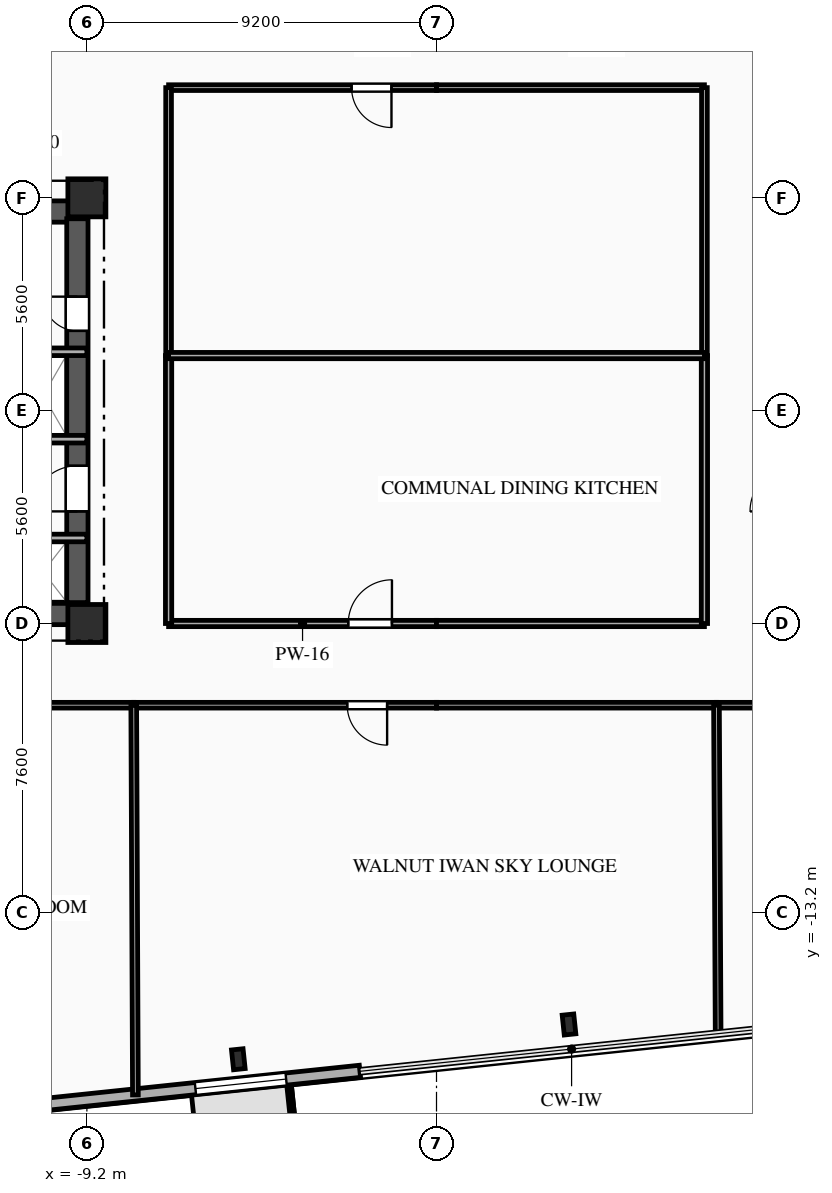
"""IFC4 building model, lengths in metres.
Left out: names, types, materials, properties, quantities, classifications, styles, units other than length and angle.
Written with IfcOpenShell. Run it as: python <this file> out.ifc"""

import sys

from ifc_helpers import new_model, si_unit, direction, frame, frame_2d, origin, origin_2d, place, context, subcontext, project, spatial, rectangle, i_section, extrude, element, fill, save


model = new_model("IFC4")
c1 = context("Model", 3, precision=1e-05, world=origin(), true_north=direction((0.0, 1.0)))
c2 = subcontext(c1, "Body", "Model", "MODEL_VIEW")
j1 = project(units=[si_unit("LENGTHUNIT", "METRE"), si_unit("PLANEANGLEUNIT", "RADIAN")], contexts=[c1])
p1 = place(None, origin())
s1 = spatial("IfcSite", under=j1, at=p1, CompositionType="ELEMENT")
p2 = place(p1, origin())
s2 = spatial("IfcBuilding", under=s1, at=p2, CompositionType="ELEMENT")
p3 = place(p2, frame((0.0, 0.0, 95.75)))
s3 = spatial("IfcBuildingStorey", under=s2, at=p3, CompositionType="ELEMENT", Elevation=95.75)
for number, where, z_axis, x_axis in (
    (1, (-9.2, -5.6, 0.0), (0.0, 0.0, 1.0), (1.0, 0.0, 0.0)),
    (2, (-9.2, 5.6, 0.0), (0.0, 0.0, 1.0), (1.0, 0.0, 0.0)),
):
    element("IfcColumn", number, at=place(p3, frame(where, z_axis=z_axis, x_axis=x_axis)), inside=s3, PredefinedType="COLUMN", context=c2, shape_type="SweptSolid", body=[
        extrude(rectangle(XDim=1.0, YDim=1.0, at=origin_2d()), origin(), (0.0, 0.0, 1.0), 3.35),
    ])
for number, where, z_axis, x_axis in (
    (3, (-5.215, -17.066, 0.0), (0.0, 0.0, 1.0), (0.995, 0.105, 0.0)),
    (4, (3.487, -16.151, 0.0), (0.0, 0.0, 1.0), (0.995, 0.105, 0.0)),
):
    element("IfcColumn", number, at=place(p3, frame(where, z_axis=z_axis, x_axis=x_axis)), inside=s3, PredefinedType="COLUMN", context=c2, shape_type="SweptSolid", body=[
        extrude(i_section(OverallWidth=0.306, OverallDepth=0.524, WebThickness=0.021, FlangeThickness=0.04, FilletRadius=0.027, at=origin_2d()), origin(), (0.0, 0.0, 1.0), 3.35),
    ])
p4 = place(p3, frame((-2.015, -17.383, 0.0), z_axis=(0.0, 0.0, 1.0), x_axis=(-0.994521393935, -0.104533233979, 0.0)))
e5 = element("IfcWall", 5, at=p4, inside=s3, PredefinedType="SOLIDWALL", context=c2, shape_type="SweptSolid", body=[
    extrude(rectangle(XDim=21.3, YDim=0.32, at=frame_2d((10.65, 0.0))), origin(), (0.0, 0.0, 1.0), 3.045),
])
p5 = place(p4, frame((1.953, 0.0, 0.85)))
e6 = element("IfcOpeningElement", 6, at=p5, cuts=e5, PredefinedType="OPENING", context=c2, shape_type="SweptSolid", body=[
    extrude(rectangle(XDim=2.4, YDim=1.95, at=frame_2d((1.2, 0.975))), frame((0.0, 0.17, 0.0), z_axis=(0.0, -1.0, 0.0), x_axis=(1.0, 0.0, 0.0)), (0.0, 0.0, 1.0), 0.34),
])
p6 = place(p4, frame((8.944, 0.0, 0.85)))
e7 = element("IfcOpeningElement", 7, at=p6, cuts=e5, PredefinedType="OPENING", context=c2, shape_type="SweptSolid", body=[
    extrude(rectangle(XDim=1.65, YDim=1.85, at=frame_2d((0.825, 0.925))), frame((0.0, 0.17, 0.0), z_axis=(0.0, -1.0, 0.0), x_axis=(1.0, 0.0, 0.0)), (0.0, 0.0, 1.0), 0.34),
])
p7 = place(p4, frame((16.391, 0.0, 0.85)))
e8 = element("IfcOpeningElement", 8, at=p7, cuts=e5, PredefinedType="OPENING", context=c2, shape_type="SweptSolid", body=[
    extrude(rectangle(XDim=1.65, YDim=1.85, at=frame_2d((0.825, 0.925))), frame((0.0, 0.17, 0.0), z_axis=(0.0, -1.0, 0.0), x_axis=(1.0, 0.0, 0.0)), (0.0, 0.0, 1.0), 0.34),
])
p8 = place(p3, frame((-18.8, 5.24, 0.0), z_axis=(0.0, 0.0, 1.0), x_axis=(1.0, 0.0, 0.0)))
e9 = element("IfcWall", 9, at=p8, inside=s3, PredefinedType="SHEAR", context=c2, shape_type="SweptSolid", body=[
    extrude(rectangle(XDim=9.6, YDim=0.56, at=frame_2d((4.8, 0.0))), origin(), (0.0, 0.0, 1.0), 3.045),
])
p9 = place(p8, frame((1.55, 0.0, 0.0)))
e10 = element("IfcOpeningElement", 10, at=p9, cuts=e9, PredefinedType="OPENING", context=c2, shape_type="SweptSolid", body=[
    extrude(rectangle(XDim=1.1, YDim=2.15, at=frame_2d((0.55, 1.075))), frame((0.0, 0.29, 0.0), z_axis=(0.0, -1.0, 0.0), x_axis=(1.0, 0.0, 0.0)), (0.0, 0.0, 1.0), 0.58),
])
p10 = place(p8, frame((4.775, 0.0, 0.0)))
e11 = element("IfcOpeningElement", 11, at=p10, cuts=e9, PredefinedType="OPENING", context=c2, shape_type="SweptSolid", body=[
    extrude(rectangle(XDim=1.05, YDim=2.1, at=frame_2d((0.525, 1.05))), frame((0.0, 0.29, 0.0), z_axis=(0.0, -1.0, 0.0), x_axis=(1.0, 0.0, 0.0)), (0.0, 0.0, 1.0), 0.58),
])
p11 = place(p3, frame((-18.8, -5.35, 0.0), z_axis=(0.0, 0.0, 1.0), x_axis=(1.0, 0.0, 0.0)))
e12 = element("IfcWall", 12, at=p11, inside=s3, PredefinedType="SHEAR", context=c2, shape_type="SweptSolid", body=[
    extrude(rectangle(XDim=9.6, YDim=0.56, at=frame_2d((4.8, 0.0))), origin(), (0.0, 0.0, 1.0), 3.045),
])
p12 = place(p11, frame((1.05, 0.0, 0.0)))
e13 = element("IfcOpeningElement", 13, at=p12, cuts=e12, PredefinedType="OPENING", context=c2, shape_type="SweptSolid", body=[
    extrude(rectangle(XDim=0.9, YDim=2.1, at=frame_2d((0.45, 1.05))), frame((0.0, 0.29, 0.0), z_axis=(0.0, -1.0, 0.0), x_axis=(1.0, 0.0, 0.0)), (0.0, 0.0, 1.0), 0.58),
])
p13 = place(p3, frame((-9.45, -5.05, 0.0), z_axis=(0.0, 0.0, 1.0), x_axis=(0.0, 1.0, 0.0)))
e14 = element("IfcWall", 14, at=p13, inside=s3, PredefinedType="SHEAR", context=c2, shape_type="SweptSolid", body=[
    extrude(rectangle(XDim=10.1, YDim=0.56, at=frame_2d((5.05, 0.0))), origin(), (0.0, 0.0, 1.0), 3.045),
])
p14 = place(p13, frame((7.15, 0.0, 0.0)))
e15 = element("IfcOpeningElement", 15, at=p14, cuts=e14, PredefinedType="OPENING", context=c2, shape_type="SweptSolid", body=[
    extrude(rectangle(XDim=0.9, YDim=2.1, at=frame_2d((0.45, 1.05))), frame((0.0, 0.29, 0.0), z_axis=(0.0, -1.0, 0.0), x_axis=(1.0, 0.0, 0.0)), (0.0, 0.0, 1.0), 0.58),
])
p15 = place(p13, frame((2.4, 0.0, 0.0)))
e16 = element("IfcOpeningElement", 16, at=p15, cuts=e14, PredefinedType="OPENING", context=c2, shape_type="SweptSolid", body=[
    extrude(rectangle(XDim=1.2, YDim=2.15, at=frame_2d((0.6, 1.075))), frame((0.0, 0.29, 0.0), z_axis=(0.0, -1.0, 0.0), x_axis=(1.0, 0.0, 0.0)), (0.0, 0.0, 1.0), 0.58),
])
p16 = place(p3, frame((-11.08, -3.35, 0.0), z_axis=(0.0, 0.0, 1.0), x_axis=(1.0, 0.0, 0.0)))
e17 = element("IfcWall", 17, at=p16, inside=s3, PredefinedType="PARTITIONING", context=c2, shape_type="SweptSolid", body=[
    extrude(rectangle(XDim=1.88, YDim=0.2, at=frame_2d((0.94, 0.0))), origin(), (0.0, 0.0, 1.0), 2.76),
])
p17 = place(p3, frame((-9.2, -0.75, 0.0), z_axis=(0.0, 0.0, 1.0), x_axis=(-1.0, 0.0, 0.0)))
e18 = element("IfcWall", 18, at=p17, inside=s3, PredefinedType="PARTITIONING", context=c2, shape_type="SweptSolid", body=[
    extrude(rectangle(XDim=1.88, YDim=0.2, at=frame_2d((0.94, 0.0))), origin(), (0.0, 0.0, 1.0), 3.045),
])
p18 = place(p3, frame((0.0, 8.5, 0.0), z_axis=(0.0, 0.0, 1.0), x_axis=(-1.0, 0.0, 0.0)))
e19 = element("IfcWall", 19, at=p18, inside=s3, PredefinedType="PARTITIONING", context=c2, shape_type="SweptSolid", body=[
    extrude(rectangle(XDim=7.05, YDim=0.15, at=frame_2d((3.525, 0.0))), origin(), (0.0, 0.0, 1.0), 3.045),
])
p19 = place(p18, frame((1.185, 0.0, 0.0)))
e20 = element("IfcOpeningElement", 20, at=p19, cuts=e19, PredefinedType="OPENING", context=c2, shape_type="SweptSolid", body=[
    extrude(rectangle(XDim=1.05, YDim=2.15, at=frame_2d((0.525, 1.075))), frame((0.0, 0.085, 0.0), z_axis=(0.0, -1.0, 0.0), x_axis=(1.0, 0.0, 0.0)), (0.0, 0.0, 1.0), 0.17),
])
p20 = place(p3, frame((7.05, 8.5, 0.0), z_axis=(0.0, 0.0, 1.0), x_axis=(-1.0, 0.0, 0.0)))
e21 = element("IfcWall", 21, at=p20, inside=s3, PredefinedType="PARTITIONING", context=c2, shape_type="SweptSolid", body=[
    extrude(rectangle(XDim=7.05, YDim=0.15, at=frame_2d((3.525, 0.0))), origin(), (0.0, 0.0, 1.0), 3.045),
])
p21 = place(p3, frame((-7.967, -7.75, 0.0), z_axis=(0.0, 0.0, 1.0), x_axis=(-1.0, 0.0, 0.0)))
e22 = element("IfcWall", 22, at=p21, inside=s3, PredefinedType="PARTITIONING", context=c2, shape_type="SweptSolid", body=[
    extrude(rectangle(XDim=7.516, YDim=0.15, at=frame_2d((3.758, 0.0))), origin(), (0.0, 0.0, 1.0), 3.045),
])
p22 = place(p21, frame((5.223, 0.0, 0.0)))
e23 = element("IfcOpeningElement", 23, at=p22, cuts=e22, PredefinedType="OPENING", context=c2, shape_type="SweptSolid", body=[
    extrude(rectangle(XDim=1.05, YDim=2.15, at=frame_2d((0.525, 1.075))), frame((0.0, 0.085, 0.0), z_axis=(0.0, -1.0, 0.0), x_axis=(1.0, 0.0, 0.0)), (0.0, 0.0, 1.0), 0.17),
])
p23 = place(p3, frame((0.0, -7.75, 0.0), z_axis=(0.0, 0.0, 1.0), x_axis=(-1.0, 0.0, 0.0)))
e24 = element("IfcWall", 24, at=p23, inside=s3, PredefinedType="PARTITIONING", context=c2, shape_type="SweptSolid", body=[
    extrude(rectangle(XDim=7.967, YDim=0.15, at=frame_2d((3.983, 0.0))), origin(), (0.0, 0.0, 1.0), 3.045),
])
p24 = place(p23, frame((1.3, 0.0, 0.0)))
e25 = element("IfcOpeningElement", 25, at=p24, cuts=e24, PredefinedType="OPENING", context=c2, shape_type="SweptSolid", body=[
    extrude(rectangle(XDim=1.05, YDim=2.15, at=frame_2d((0.525, 1.075))), frame((0.0, 0.085, 0.0), z_axis=(0.0, -1.0, 0.0), x_axis=(1.0, 0.0, 0.0)), (0.0, 0.0, 1.0), 0.17),
])
p25 = place(p3, frame((-7.05, -5.6, 0.0), z_axis=(0.0, 0.0, 1.0), x_axis=(1.0, 0.0, 0.0)))
e26 = element("IfcWall", 26, at=p25, inside=s3, PredefinedType="PARTITIONING", context=c2, shape_type="SweptSolid", body=[
    extrude(rectangle(XDim=7.05, YDim=0.165, at=frame_2d((3.525, 0.0))), origin(), (0.0, 0.0, 1.0), 2.53),
])
p26 = place(p25, frame((4.728, 0.0, 0.0)))
e27 = element("IfcOpeningElement", 27, at=p26, cuts=e26, PredefinedType="OPENING", context=c2, shape_type="SweptSolid", body=[
    extrude(rectangle(XDim=1.15, YDim=2.15, at=frame_2d((0.575, 1.075))), frame((0.0, 0.093, 0.0), z_axis=(0.0, -1.0, 0.0), x_axis=(1.0, 0.0, 0.0)), (0.0, 0.0, 1.0), 0.185),
])
p27 = place(p3, frame((7.367, -7.75, 0.0), z_axis=(0.0, 0.0, 1.0), x_axis=(-1.0, 0.0, 0.0)))
e28 = element("IfcWall", 28, at=p27, inside=s3, PredefinedType="PARTITIONING", context=c2, shape_type="SweptSolid", body=[
    extrude(rectangle(XDim=7.367, YDim=0.15, at=frame_2d((3.684, 0.0))), origin(), (0.0, 0.0, 1.0), 3.045),
])
p28 = place(p3, frame((23.0, -7.75, 0.0), z_axis=(0.0, 0.0, 1.0), x_axis=(-1.0, 0.0, 0.0)))
e29 = element("IfcWall", 29, at=p28, inside=s3, PredefinedType="PARTITIONING", context=c2, shape_type="SweptSolid", body=[
    extrude(rectangle(XDim=15.633, YDim=0.15, at=frame_2d((7.816, 0.0))), origin(), (0.0, 0.0, 1.0), 3.045),
])
p29 = place(p28, frame((8.969, 0.0, 0.0)))
e30 = element("IfcOpeningElement", 30, at=p29, cuts=e29, PredefinedType="OPENING", context=c2, shape_type="SweptSolid", body=[
    extrude(rectangle(XDim=1.05, YDim=2.15, at=frame_2d((0.525, 1.075))), frame((0.0, 0.085, 0.0), z_axis=(0.0, -1.0, 0.0), x_axis=(1.0, 0.0, 0.0)), (0.0, 0.0, 1.0), 0.17),
])
p30 = place(p3, frame((0.0, -5.6, 0.0), z_axis=(0.0, 0.0, 1.0), x_axis=(1.0, 0.0, 0.0)))
e31 = element("IfcWall", 31, at=p30, inside=s3, PredefinedType="PARTITIONING", context=c2, shape_type="SweptSolid", body=[
    extrude(rectangle(XDim=7.05, YDim=0.165, at=frame_2d((3.525, 0.0))), origin(), (0.0, 0.0, 1.0), 2.53),
])
p31 = place(p3, frame((-7.05, 1.45, 0.0), z_axis=(0.0, 0.0, 1.0), x_axis=(0.0, -1.0, 0.0)))
e32 = element("IfcWall", 32, at=p31, inside=s3, PredefinedType="PARTITIONING", context=c2, shape_type="SweptSolid", body=[
    extrude(rectangle(XDim=7.05, YDim=0.165, at=frame_2d((3.525, 0.0))), origin(), (0.0, 0.0, 1.0), 3.045),
])
p32 = place(p3, frame((-7.05, 8.5, 0.0), z_axis=(0.0, 0.0, 1.0), x_axis=(0.0, -1.0, 0.0)))
e33 = element("IfcWall", 33, at=p32, inside=s3, PredefinedType="PARTITIONING", context=c2, shape_type="SweptSolid", body=[
    extrude(rectangle(XDim=7.05, YDim=0.15, at=frame_2d((3.525, 0.0))), origin(), (0.0, 0.0, 1.0), 3.045),
])
p33 = place(p3, frame((7.05, -5.6, 0.0), z_axis=(0.0, 0.0, 1.0), x_axis=(0.0, 1.0, 0.0)))
e34 = element("IfcWall", 34, at=p33, inside=s3, PredefinedType="PARTITIONING", context=c2, shape_type="SweptSolid", body=[
    extrude(rectangle(XDim=7.05, YDim=0.165, at=frame_2d((3.525, 0.0))), origin(), (0.0, 0.0, 1.0), 3.045),
])
p34 = place(p3, frame((7.05, 1.45, 0.0), z_axis=(0.0, 0.0, 1.0), x_axis=(0.0, 1.0, 0.0)))
e35 = element("IfcWall", 35, at=p34, inside=s3, PredefinedType="PARTITIONING", context=c2, shape_type="SweptSolid", body=[
    extrude(rectangle(XDim=7.05, YDim=0.15, at=frame_2d((3.525, 0.0))), origin(), (0.0, 0.0, 1.0), 3.045),
])
p35 = place(p3, frame((-7.967, -7.75, 0.0), z_axis=(0.0, 0.0, 1.0), x_axis=(0.004285674928, -0.999990816453, 0.0)))
e36 = element("IfcWall", 36, at=p35, inside=s3, PredefinedType="PARTITIONING", context=c2, shape_type="SweptSolid", body=[
    extrude(rectangle(XDim=10.254, YDim=0.15, at=frame_2d((5.127, 0.0))), origin(), (0.0, 0.0, 1.0), 3.045),
])
p36 = place(p3, frame((7.367, -7.75, 0.0), z_axis=(0.0, 0.0, 1.0), x_axis=(0.005084967311, -0.99998707147, 0.0)))
e37 = element("IfcWall", 37, at=p36, inside=s3, PredefinedType="PARTITIONING", context=c2, shape_type="SweptSolid", body=[
    extrude(rectangle(XDim=8.642, YDim=0.15, at=frame_2d((4.321, 0.0))), origin(), (0.0, 0.0, 1.0), 3.045),
])
p37 = place(p3, frame((-7.05, 1.45, 0.0), z_axis=(0.0, 0.0, 1.0), x_axis=(1.0, 0.0, 0.0)))
e38 = element("IfcWall", 38, at=p37, inside=s3, PredefinedType="PARTITIONING", context=c2, shape_type="SweptSolid", body=[
    extrude(rectangle(XDim=14.1, YDim=0.165, at=frame_2d((7.05, 0.0))), origin(), (0.0, 0.0, 1.0), 3.045),
])
p38 = place(p3, frame((-15.05, 1.55, 0.0), z_axis=(0.0, 0.0, 1.0), x_axis=(1.0, 0.0, 0.0)))
e39 = element("IfcWall", 39, at=p38, inside=s3, PredefinedType="PARTITIONING", context=c2, shape_type="SweptSolid", body=[
    extrude(rectangle(XDim=5.85, YDim=0.2, at=frame_2d((2.925, 0.0))), origin(), (0.0, 0.0, 1.0), 3.045),
])
p39 = place(p5, origin())
e40 = element("IfcWindow", 40, at=p39, inside=s3, PartitioningType="SINGLE_PANEL", PredefinedType="WINDOW", context=c2, shape_type="SweptSolid", body=[
    extrude(rectangle(XDim=2.4, YDim=1.95, at=frame_2d((1.2, 0.975))), frame((0.0, 0.03, 0.0), z_axis=(0.0, -1.0, 0.0), x_axis=(1.0, 0.0, 0.0)), (0.0, 0.0, 1.0), 0.06),
])
fill(e6, e40)
p40 = place(p14, origin())
e41 = element("IfcDoor", 41, at=p40, inside=s3, OperationType="SINGLE_SWING_RIGHT", PredefinedType="DOOR", context=c2, shape_type="SweptSolid", body=[
    extrude(rectangle(XDim=0.9, YDim=2.1, at=frame_2d((0.45, 1.05))), frame((0.0, 0.025, 0.0), z_axis=(0.0, -1.0, 0.0), x_axis=(1.0, 0.0, 0.0)), (0.0, 0.0, 1.0), 0.05),
])
fill(e15, e41)
p41 = place(p15, origin())
e42 = element("IfcDoor", 42, at=p41, inside=s3, OperationType="SINGLE_SWING_LEFT", PredefinedType="DOOR", context=c2, shape_type="SweptSolid", body=[
    extrude(rectangle(XDim=1.2, YDim=2.15, at=frame_2d((0.6, 1.075))), frame((0.0, 0.025, 0.0), z_axis=(0.0, -1.0, 0.0), x_axis=(1.0, 0.0, 0.0)), (0.0, 0.0, 1.0), 0.05),
])
fill(e16, e42)
p42 = place(p19, origin())
e43 = element("IfcDoor", 43, at=p42, inside=s3, OperationType="SINGLE_SWING_LEFT", PredefinedType="DOOR", context=c2, shape_type="SweptSolid", body=[
    extrude(rectangle(XDim=1.05, YDim=2.15, at=frame_2d((0.525, 1.075))), frame((0.0, 0.025, 0.0), z_axis=(0.0, -1.0, 0.0), x_axis=(1.0, 0.0, 0.0)), (0.0, 0.0, 1.0), 0.05),
])
fill(e20, e43)
p43 = place(p24, origin())
e44 = element("IfcDoor", 44, at=p43, inside=s3, OperationType="SINGLE_SWING_LEFT", PredefinedType="DOOR", context=c2, shape_type="SweptSolid", body=[
    extrude(rectangle(XDim=1.05, YDim=2.15, at=frame_2d((0.525, 1.075))), frame((0.0, 0.025, 0.0), z_axis=(0.0, -1.0, 0.0), x_axis=(1.0, 0.0, 0.0)), (0.0, 0.0, 1.0), 0.05),
])
fill(e25, e44)
p44 = place(p26, origin())
e45 = element("IfcDoor", 45, at=p44, inside=s3, OperationType="SINGLE_SWING_RIGHT", PredefinedType="DOOR", context=c2, shape_type="SweptSolid", body=[
    extrude(rectangle(XDim=1.15, YDim=2.15, at=frame_2d((0.575, 1.075))), frame((0.0, 0.025, 0.0), z_axis=(0.0, -1.0, 0.0), x_axis=(1.0, 0.0, 0.0)), (0.0, 0.0, 1.0), 0.05),
])
fill(e27, e45)
save(model, sys.argv[1])
